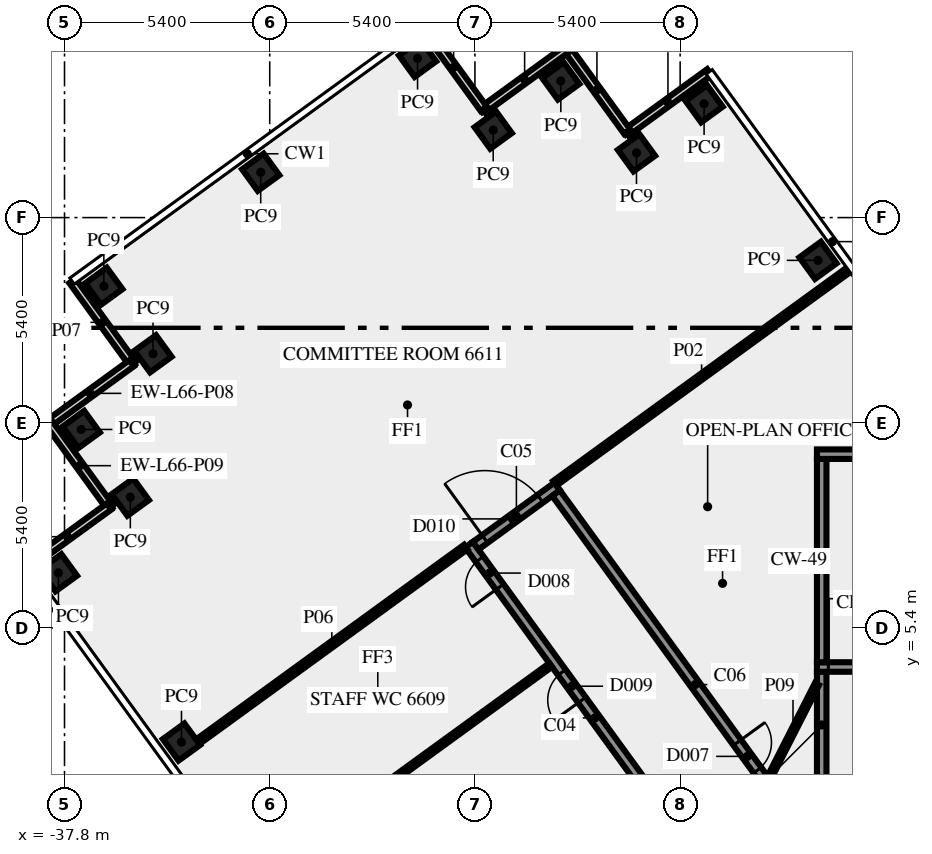
"""IFC4 building model, lengths in metres.
Left out: names, types, materials, properties, quantities, classifications, styles, units other than length and angle.
Written with IfcOpenShell. Run it as: python <this file> out.ifc"""

import sys

from ifc_helpers import new_model, si_unit, direction, frame, frame_2d, origin, origin_2d, place, context, subcontext, project, spatial, rectangle, extrude, element, fill, save


model = new_model("IFC4")
c1 = context("Model", 3, precision=1e-05, world=origin(), true_north=direction((0.0, 1.0)))
c2 = subcontext(c1, "Body", "Model", "MODEL_VIEW")
j1 = project(units=[si_unit("LENGTHUNIT", "METRE"), si_unit("PLANEANGLEUNIT", "RADIAN")], contexts=[c1])
p1 = place(None, origin())
s1 = spatial("IfcSite", under=j1, at=p1, CompositionType="ELEMENT")
p2 = place(p1, origin())
s2 = spatial("IfcBuilding", under=s1, at=p2, CompositionType="ELEMENT")
p3 = place(p2, frame((0.0, 0.0, 285.0)))
s3 = spatial("IfcBuildingStorey", under=s2, at=p3, CompositionType="ELEMENT", Elevation=285.0)
for number, where, z_axis, x_axis in (
    (1, (-17.974, 15.075, 0.0), (0.0, 0.0, 1.0), (-0.588, 0.809, 0.0)),
    (2, (-20.97, 19.195, 0.0), (0.0, 0.0, 1.0), (-0.588, 0.809, 0.0)),
    (3, (-22.749, 17.904, 0.0), (0.0, 0.0, 1.0), (-0.588, 0.809, 0.0)),
    (4, (-24.74, 19.795, 0.0), (0.0, 0.0, 1.0), (-0.588, 0.809, 0.0)),
    (5, (-26.519, 18.5, 0.0), (0.0, 0.0, 1.0), (-0.588, 0.809, 0.0)),
    (6, (-28.51, 20.39, 0.0), (0.0, 0.0, 1.0), (-0.809, -0.588, 0.0)),
    (7, (-32.637, 17.393, 0.0), (0.0, 0.0, 1.0), (-0.809, -0.588, 0.0)),
    (8, (-36.765, 14.395, 0.0), (0.0, 0.0, 1.0), (0.588, -0.809, 0.0)),
    (9, (-35.471, 12.616, 0.0), (0.0, 0.0, 1.0), (-0.809, -0.588, 0.0)),
    (10, (-37.36, 10.625, 0.0), (0.0, 0.0, 1.0), (0.588, -0.809, 0.0)),
    (11, (-36.068, 8.844, 0.0), (0.0, 0.0, 1.0), (0.588, -0.809, 0.0)),
    (12, (-37.96, 6.855, 0.0), (0.0, 0.0, 1.0), (0.588, -0.809, 0.0)),
    (13, (-34.722, 2.4, 0.0), (0.0, 0.0, 1.0), (0.588, -0.809, 0.0)),
):
    element("IfcColumn", number, at=place(p3, frame(where, z_axis=z_axis, x_axis=x_axis)), inside=s3, PredefinedType="COLUMN", context=c2, shape_type="SweptSolid", body=[
        extrude(rectangle(XDim=0.7, YDim=0.7, at=origin_2d()), origin(), (0.0, 0.0, 1.0), 3.65),
    ])
for number, where, z_axis, x_axis in (
    (14, (-20.829, 20.025, 0.0), (0.0, 0.0, 1.0), (-0.809, -0.588, 0.0)),
    (15, (-22.996, 18.466, 0.0), (0.0, 0.0, 1.0), (-0.588, 0.809, 0.0)),
):
    element("IfcWall", number, at=place(p3, frame(where, z_axis=z_axis, x_axis=x_axis)), inside=s3, PredefinedType="SOLIDWALL", context=c2, shape_type="SweptSolid", body=[
        extrude(rectangle(XDim=2.7, YDim=0.2, at=frame_2d((1.35, 0.0))), origin(), (0.0, 0.0, 1.0), 3.65),
    ])
for number, where, z_axis, x_axis in (
    (16, (-24.6, 20.623, 0.0), (0.0, 0.0, 1.0), (-0.809, -0.588, 0.0)),
    (17, (-26.768, 19.063, 0.0), (0.0, 0.0, 1.0), (-0.588, 0.809, 0.0)),
):
    element("IfcWall", number, at=place(p3, frame(where, z_axis=z_axis, x_axis=x_axis)), inside=s3, PredefinedType="SOLIDWALL", context=c2, shape_type="SweptSolid", body=[
        extrude(rectangle(XDim=2.7, YDim=0.2, at=frame_2d((1.35, 0.0))), origin(), (0.0, 0.0, 1.0), 3.65),
    ])
for number, where, z_axis, x_axis in (
    (18, (-37.592, 14.536, 0.0), (0.0, 0.0, 1.0), (0.588, -0.809, 0.0)),
    (19, (-36.032, 12.369, 0.0), (0.0, 0.0, 1.0), (-0.809, -0.588, 0.0)),
    (20, (-38.189, 10.765, 0.0), (0.0, 0.0, 1.0), (0.588, -0.809, 0.0)),
    (21, (-36.629, 8.597, 0.0), (0.0, 0.0, 1.0), (-0.809, -0.588, 0.0)),
):
    element("IfcWall", number, at=place(p3, frame(where, z_axis=z_axis, x_axis=x_axis)), inside=s3, PredefinedType="SOLIDWALL", context=c2, shape_type="SweptSolid", body=[
        extrude(rectangle(XDim=2.7, YDim=0.2, at=frame_2d((1.35, 0.0))), origin(), (0.0, 0.0, 1.0), 3.65),
    ])
p4 = place(p3, frame((-17.875, 1.45, 0.0), z_axis=(0.0, 0.0, 1.0), x_axis=(0.0, 1.0, 0.0)))
e22 = element("IfcWall", 22, at=p4, inside=s3, PredefinedType="SHEAR", context=c2, shape_type="SweptSolid", body=[
    extrude(rectangle(XDim=2.8, YDim=0.25, at=frame_2d((1.4, 0.0))), origin(), (0.0, 0.0, 1.0), 3.65),
])
p5 = place(p3, frame((-18.0, 4.375, 0.0), z_axis=(0.0, 0.0, 1.0), x_axis=(1.0, 0.0, 0.0)))
e23 = element("IfcWall", 23, at=p5, inside=s3, PredefinedType="SHEAR", context=c2, shape_type="SweptSolid", body=[
    extrude(rectangle(XDim=10.5, YDim=0.25, at=frame_2d((5.25, 0.0))), origin(), (0.0, 0.0, 1.0), 3.65),
])
p6 = place(p5, frame((0.3, 0.0, 0.0)))
e24 = element("IfcOpeningElement", 24, at=p6, cuts=e23, PredefinedType="OPENING", context=c2, shape_type="SweptSolid", body=[
    extrude(rectangle(XDim=1.8, YDim=2.1, at=frame_2d((0.9, 1.05))), frame((0.0, 0.135, 0.0), z_axis=(0.0, -1.0, 0.0), x_axis=(1.0, 0.0, 0.0)), (0.0, 0.0, 1.0), 0.27),
])
p7 = place(p3, frame((-17.875, 4.5, 0.0), z_axis=(0.0, 0.0, 1.0), x_axis=(0.0, 1.0, 0.0)))
e25 = element("IfcWall", 25, at=p7, inside=s3, PredefinedType="SHEAR", context=c2, shape_type="SweptSolid", body=[
    extrude(rectangle(XDim=5.35, YDim=0.25, at=frame_2d((2.675, 0.0))), origin(), (0.0, 0.0, 1.0), 3.65),
])
p8 = place(p3, frame((-18.0, 9.975, 0.0), z_axis=(0.0, 0.0, 1.0), x_axis=(1.0, 0.0, 0.0)))
e26 = element("IfcWall", 26, at=p8, inside=s3, PredefinedType="SHEAR", context=c2, shape_type="SweptSolid", body=[
    extrude(rectangle(XDim=10.5, YDim=0.25, at=frame_2d((5.25, 0.0))), origin(), (0.0, 0.0, 1.0), 3.65),
])
p9 = place(p8, frame((4.5, 0.0, 1.0)))
e27 = element("IfcOpeningElement", 27, at=p9, cuts=e26, PredefinedType="OPENING", context=c2, shape_type="SweptSolid", body=[
    extrude(rectangle(XDim=1.2, YDim=1.2, at=frame_2d((0.6, 0.6))), frame((0.0, 0.135, 0.0), z_axis=(0.0, -1.0, 0.0), x_axis=(1.0, 0.0, 0.0)), (0.0, 0.0, 1.0), 0.27),
])
p10 = place(p3, frame((-20.531, -1.523, 0.0), z_axis=(0.0, 0.0, 1.0), x_axis=(-0.587782646447, 0.809018887626, 0.0)))
e28 = element("IfcWall", 28, at=p10, inside=s3, PredefinedType="SOLIDWALL", context=c2, shape_type="SweptSolid", body=[
    extrude(rectangle(XDim=11.27, YDim=0.25, at=frame_2d((5.635, 0.0))), origin(), (0.0, 0.0, 1.0), 3.65),
])
p11 = place(p10, frame((6.216, 0.0, 0.0)))
e29 = element("IfcOpeningElement", 29, at=p11, cuts=e28, PredefinedType="OPENING", context=c2, shape_type="SweptSolid", body=[
    extrude(rectangle(XDim=0.9, YDim=2.1, at=frame_2d((0.45, 1.05))), frame((0.0, 0.135, 0.0), z_axis=(0.0, -1.0, 0.0), x_axis=(1.0, 0.0, 0.0)), (0.0, 0.0, 1.0), 0.27),
])
p12 = place(p10, frame((9.896, 0.0, 0.0)))
e30 = element("IfcOpeningElement", 30, at=p12, cuts=e28, PredefinedType="OPENING", context=c2, shape_type="SweptSolid", body=[
    extrude(rectangle(XDim=0.9, YDim=2.1, at=frame_2d((0.45, 1.05))), frame((0.0, 0.135, 0.0), z_axis=(0.0, -1.0, 0.0), x_axis=(1.0, 0.0, 0.0)), (0.0, 0.0, 1.0), 0.27),
])
p13 = place(p3, frame((-26.981, 7.567, 0.0), z_axis=(0.0, 0.0, 1.0), x_axis=(0.809038743598, 0.587755315891, 0.0)))
e31 = element("IfcWall", 31, at=p13, inside=s3, PredefinedType="SOLIDWALL", context=c2, shape_type="SweptSolid", body=[
    extrude(rectangle(XDim=2.65, YDim=0.25, at=frame_2d((1.325, 0.0))), origin(), (0.0, 0.0, 1.0), 3.65),
])
p14 = place(p13, frame((0.3, 0.0, 0.0)))
e32 = element("IfcOpeningElement", 32, at=p14, cuts=e31, PredefinedType="OPENING", context=c2, shape_type="SweptSolid", body=[
    extrude(rectangle(XDim=1.8, YDim=2.1, at=frame_2d((0.9, 1.05))), frame((0.0, 0.135, 0.0), z_axis=(0.0, -1.0, 0.0), x_axis=(1.0, 0.0, 0.0)), (0.0, 0.0, 1.0), 0.27),
])
p15 = place(p3, frame((-24.865, 8.95, 0.0), z_axis=(0.0, 0.0, 1.0), x_axis=(0.587791617212, -0.809012369952, 0.0)))
e33 = element("IfcWall", 33, at=p15, inside=s3, PredefinedType="SOLIDWALL", context=c2, shape_type="SweptSolid", body=[
    extrude(rectangle(XDim=12.453, YDim=0.25, at=frame_2d((6.227, 0.0))), origin(), (0.0, 0.0, 1.0), 3.65),
])
p16 = place(p15, frame((8.112, 0.0, 0.0)))
e34 = element("IfcOpeningElement", 34, at=p16, cuts=e33, PredefinedType="OPENING", context=c2, shape_type="SweptSolid", body=[
    extrude(rectangle(XDim=0.9, YDim=2.1, at=frame_2d((0.45, 1.05))), frame((0.0, 0.135, 0.0), z_axis=(0.0, -1.0, 0.0), x_axis=(1.0, 0.0, 0.0)), (0.0, 0.0, 1.0), 0.27),
])
p17 = place(p3, frame((-17.172, 14.823, 0.0), z_axis=(0.0, 0.0, 1.0), x_axis=(-0.809013490065, -0.587790075531, 0.0)))
e35 = element("IfcWall", 35, at=p17, inside=s3, PredefinedType="PARTITIONING", context=c2, shape_type="SweptSolid", body=[
    extrude(rectangle(XDim=9.549, YDim=0.15, at=frame_2d((4.775, 0.0))), origin(), (0.0, 0.0, 1.0), 2.95),
])
p18 = place(p3, frame((-25.008, 4.427, 0.0), z_axis=(0.0, 0.0, 1.0), x_axis=(-0.808994684961, -0.587815957341, 0.0)))
e36 = element("IfcWall", 36, at=p18, inside=s3, PredefinedType="PARTITIONING", context=c2, shape_type="SweptSolid", body=[
    extrude(rectangle(XDim=9.55, YDim=0.12, at=frame_2d((4.775, 0.0))), origin(), (0.0, 0.0, 1.0), 2.95),
])
p19 = place(p3, frame((-34.291, 2.41, 0.0), z_axis=(0.0, 0.0, 1.0), x_axis=(0.809027940177, 0.587770186393, 0.0)))
e37 = element("IfcWall", 37, at=p19, inside=s3, PredefinedType="PARTITIONING", context=c2, shape_type="SweptSolid", body=[
    extrude(rectangle(XDim=8.715, YDim=0.15, at=frame_2d((4.357, 0.0))), origin(), (0.0, 0.0, 1.0), 3.65),
])
p20 = place(p3, frame((-19.261, 1.45, 0.0), z_axis=(0.0, 0.0, 1.0), x_axis=(0.453950796792, 0.891026752736, 0.0)))
e38 = element("IfcWall", 38, at=p20, inside=s3, PredefinedType="PARTITIONING", context=c2, shape_type="SweptSolid", body=[
    extrude(rectangle(XDim=2.778, YDim=0.12, at=frame_2d((1.389, 0.0))), origin(), (0.0, 0.0, 1.0), 3.65),
])
p21 = place(p6, origin())
e39 = element("IfcDoor", 39, at=p21, inside=s3, OperationType="DOUBLE_DOOR_SINGLE_SWING", PredefinedType="DOOR", context=c2, shape_type="SweptSolid", body=[
    extrude(rectangle(XDim=1.8, YDim=2.1, at=frame_2d((0.9, 1.05))), frame((0.0, 0.025, 0.0), z_axis=(0.0, -1.0, 0.0), x_axis=(1.0, 0.0, 0.0)), (0.0, 0.0, 1.0), 0.05),
])
fill(e24, e39)
p22 = place(p16, origin())
e40 = element("IfcDoor", 40, at=p22, inside=s3, OperationType="SINGLE_SWING_RIGHT", PredefinedType="DOOR", context=c2, shape_type="SweptSolid", body=[
    extrude(rectangle(XDim=0.9, YDim=2.1, at=frame_2d((0.45, 1.05))), frame((0.0, 0.025, 0.0), z_axis=(0.0, -1.0, 0.0), x_axis=(1.0, 0.0, 0.0)), (0.0, 0.0, 1.0), 0.05),
])
fill(e34, e40)
p23 = place(p11, origin())
e41 = element("IfcDoor", 41, at=p23, inside=s3, OperationType="SINGLE_SWING_RIGHT", PredefinedType="DOOR", context=c2, shape_type="SweptSolid", body=[
    extrude(rectangle(XDim=0.9, YDim=2.1, at=frame_2d((0.45, 1.05))), frame((0.0, 0.025, 0.0), z_axis=(0.0, -1.0, 0.0), x_axis=(1.0, 0.0, 0.0)), (0.0, 0.0, 1.0), 0.05),
])
fill(e29, e41)
p24 = place(p14, origin())
e42 = element("IfcDoor", 42, at=p24, inside=s3, OperationType="DOUBLE_DOOR_SINGLE_SWING", PredefinedType="DOOR", context=c2, shape_type="SweptSolid", body=[
    extrude(rectangle(XDim=1.8, YDim=2.1, at=frame_2d((0.9, 1.05))), frame((0.0, 0.025, 0.0), z_axis=(0.0, -1.0, 0.0), x_axis=(1.0, 0.0, 0.0)), (0.0, 0.0, 1.0), 0.05),
])
fill(e32, e42)
p25 = place(p12, origin())
e43 = element("IfcDoor", 43, at=p25, inside=s3, OperationType="SINGLE_SWING_RIGHT", PredefinedType="DOOR", context=c2, shape_type="SweptSolid", body=[
    extrude(rectangle(XDim=0.9, YDim=2.1, at=frame_2d((0.45, 1.05))), frame((0.0, 0.025, 0.0), z_axis=(0.0, -1.0, 0.0), x_axis=(1.0, 0.0, 0.0)), (0.0, 0.0, 1.0), 0.05),
])
fill(e30, e43)
save(model, sys.argv[1])
